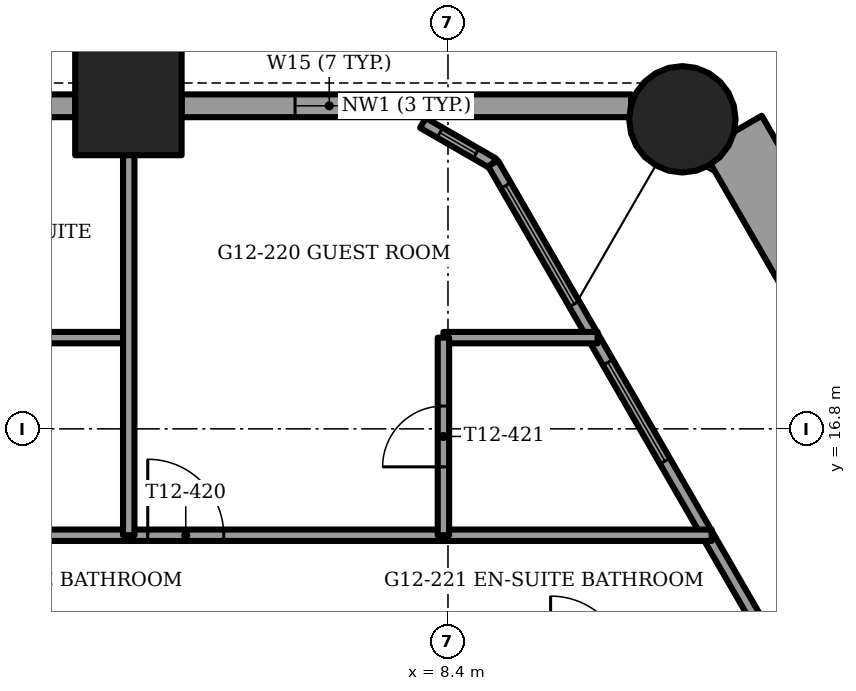
"""IFC4 building model, lengths in metres.
Left out: names, types, materials, properties, quantities, classifications, styles, units other than length and angle.
Written with IfcOpenShell. Run it as: python <this file> out.ifc"""

import sys

from ifc_helpers import new_model, si_unit, direction, frame, frame_2d, origin, origin_2d, place, context, subcontext, project, spatial, rectangle, circle, extrude, element, fill, save


model = new_model("IFC4")
c1 = context("Model", 3, precision=1e-05, world=origin(), true_north=direction((0.0, 1.0)))
c2 = subcontext(c1, "Body", "Model", "MODEL_VIEW")
j1 = project(units=[si_unit("LENGTHUNIT", "METRE"), si_unit("PLANEANGLEUNIT", "RADIAN")], contexts=[c1])
p1 = place(None, origin())
s1 = spatial("IfcSite", under=j1, at=p1, CompositionType="ELEMENT")
p2 = place(p1, origin())
s2 = spatial("IfcBuilding", under=s1, at=p2, CompositionType="ELEMENT")
p3 = place(p2, frame((0.0, 0.0, 50.5)))
s3 = spatial("IfcBuildingStorey", under=s2, at=p3, CompositionType="ELEMENT", Elevation=50.5)
p4 = place(p3, frame((11.484, 20.872, -1.2), z_axis=(0.0, 0.0, 1.0), x_axis=(1.0, 0.0, 0.0)))
e1 = element("IfcColumn", 1, at=p4, inside=s3, PredefinedType="COLUMN", context=c2, shape_type="SweptSolid", body=[
    extrude(circle(Radius=0.7, at=origin_2d()), origin(), (0.0, 0.0, 1.0), 3.75),
])
p5 = place(p3, frame((4.195, 21.1, -1.2), z_axis=(0.0, 0.0, 1.0), x_axis=(1.0, 0.0, 0.0)))
e2 = element("IfcColumn", 2, at=p5, inside=s3, PredefinedType="COLUMN", context=c2, shape_type="SweptSolid", body=[
    extrude(rectangle(XDim=1.4, YDim=1.4, at=origin_2d()), origin(), (0.0, 0.0, 1.0), 3.75),
])
p6 = place(p3, frame((15.632, 14.643, 0.0), z_axis=(0.0, 0.0, 1.0), x_axis=(-0.500009789943, 0.866019751484, 0.0)))
e3 = element("IfcWall", 3, at=p6, inside=s3, PredefinedType="PARAPET", context=c2, shape_type="SweptSolid", body=[
    extrude(rectangle(XDim=6.987, YDim=0.9, at=frame_2d((3.494, 0.0))), origin(), (0.0, 0.0, 1.0), 1.1),
])
p7 = place(p3, frame((10.81, 21.05, 0.0), z_axis=(0.0, 0.0, 1.0), x_axis=(-1.0, 0.0, 0.0)))
e4 = element("IfcWall", 4, at=p7, inside=s3, PredefinedType="SOLIDWALL", context=c2, shape_type="SweptSolid", body=[
    extrude(rectangle(XDim=5.914, YDim=0.3, at=frame_2d((2.957, 0.0))), origin(), (0.0, 0.0, 1.0), 2.55),
])
p8 = place(p7, frame((3.522, 0.0, 0.15)))
e5 = element("IfcOpeningElement", 5, at=p8, cuts=e4, PredefinedType="OPENING", context=c2, shape_type="SweptSolid", body=[
    extrude(rectangle(XDim=0.9, YDim=2.15, at=frame_2d((0.45, 1.075))), frame((0.0, 0.15, 0.0), z_axis=(0.0, -1.0, 0.0), x_axis=(1.0, 0.0, 0.0)), (0.0, 0.0, 1.0), 0.3),
])
p9 = place(p3, frame((3.495, 21.05, 0.0), z_axis=(0.0, 0.0, 1.0), x_axis=(-1.0, 0.0, 0.0)))
e6 = element("IfcWall", 6, at=p9, inside=s3, PredefinedType="SOLIDWALL", context=c2, shape_type="SweptSolid", body=[
    extrude(rectangle(XDim=6.991, YDim=0.3, at=frame_2d((3.495, 0.0))), origin(), (0.0, 0.0, 1.0), 2.55),
])
p10 = place(p9, frame((1.3, 0.0, 0.15)))
e7 = element("IfcOpeningElement", 7, at=p10, cuts=e6, PredefinedType="OPENING", context=c2, shape_type="SweptSolid", body=[
    extrude(rectangle(XDim=0.9, YDim=2.15, at=frame_2d((0.45, 1.075))), frame((0.0, 0.15, 0.0), z_axis=(0.0, -1.0, 0.0), x_axis=(1.0, 0.0, 0.0)), (0.0, 0.0, 1.0), 0.3),
])
p11 = place(p9, frame((4.795, 0.0, 0.15)))
e8 = element("IfcOpeningElement", 8, at=p11, cuts=e6, PredefinedType="OPENING", context=c2, shape_type="SweptSolid", body=[
    extrude(rectangle(XDim=0.9, YDim=2.15, at=frame_2d((0.45, 1.075))), frame((0.0, 0.15, 0.0), z_axis=(0.0, -1.0, 0.0), x_axis=(1.0, 0.0, 0.0)), (0.0, 0.0, 1.0), 0.3),
])
p12 = place(p3, frame((20.685, 0.042, 0.0), z_axis=(0.0, 0.0, 1.0), x_axis=(-0.49999960747, 0.866025630412, 0.0)))
e9 = element("IfcWall", 9, at=p12, inside=s3, PredefinedType="SOLIDWALL", context=c2, shape_type="SweptSolid", body=[
    extrude(rectangle(XDim=23.384, YDim=0.15, at=frame_2d((11.692, 0.0))), origin(), (0.0, 0.0, 1.0), 3.45),
])
p13 = place(p12, frame((4.491, 0.0, 0.15)))
e10 = element("IfcOpeningElement", 10, at=p13, cuts=e9, PredefinedType="OPENING", context=c2, shape_type="SweptSolid", body=[
    extrude(rectangle(XDim=1.8, YDim=2.85, at=frame_2d((0.9, 1.425))), frame((0.0, 0.075, 0.0), z_axis=(0.0, -1.0, 0.0), x_axis=(1.0, 0.0, 0.0)), (0.0, 0.0, 1.0), 0.15),
])
p14 = place(p12, frame((6.406, 0.0, 0.15)))
e11 = element("IfcOpeningElement", 11, at=p14, cuts=e9, PredefinedType="OPENING", context=c2, shape_type="SweptSolid", body=[
    extrude(rectangle(XDim=1.5, YDim=2.85, at=frame_2d((0.75, 1.425))), frame((0.0, 0.075, 0.0), z_axis=(0.0, -1.0, 0.0), x_axis=(1.0, 0.0, 0.0)), (0.0, 0.0, 1.0), 0.15),
])
p15 = place(p12, frame((8.506, 0.0, 0.15)))
e12 = element("IfcOpeningElement", 12, at=p15, cuts=e9, PredefinedType="OPENING", context=c2, shape_type="SweptSolid", body=[
    extrude(rectangle(XDim=1.8, YDim=2.85, at=frame_2d((0.9, 1.425))), frame((0.0, 0.075, 0.0), z_axis=(0.0, -1.0, 0.0), x_axis=(1.0, 0.0, 0.0)), (0.0, 0.0, 1.0), 0.15),
])
p16 = place(p12, frame((10.606, 0.0, 0.15)))
e13 = element("IfcOpeningElement", 13, at=p16, cuts=e9, PredefinedType="OPENING", context=c2, shape_type="SweptSolid", body=[
    extrude(rectangle(XDim=1.5, YDim=2.85, at=frame_2d((0.75, 1.425))), frame((0.0, 0.075, 0.0), z_axis=(0.0, -1.0, 0.0), x_axis=(1.0, 0.0, 0.0)), (0.0, 0.0, 1.0), 0.15),
])
p17 = place(p12, frame((14.806, 0.0, 0.15)))
e14 = element("IfcOpeningElement", 14, at=p17, cuts=e9, PredefinedType="OPENING", context=c2, shape_type="SweptSolid", body=[
    extrude(rectangle(XDim=1.5, YDim=2.85, at=frame_2d((0.75, 1.425))), frame((0.0, 0.075, 0.0), z_axis=(0.0, -1.0, 0.0), x_axis=(1.0, 0.0, 0.0)), (0.0, 0.0, 1.0), 0.15),
])
p18 = place(p12, frame((18.861, 0.0, 0.15)))
e15 = element("IfcOpeningElement", 15, at=p18, cuts=e9, PredefinedType="OPENING", context=c2, shape_type="SweptSolid", body=[
    extrude(rectangle(XDim=1.5, YDim=2.85, at=frame_2d((0.75, 1.425))), frame((0.0, 0.075, 0.0), z_axis=(0.0, -1.0, 0.0), x_axis=(1.0, 0.0, 0.0)), (0.0, 0.0, 1.0), 0.15),
])
p19 = place(p12, frame((1.422, 0.0, 0.15)))
e16 = element("IfcOpeningElement", 16, at=p19, cuts=e9, PredefinedType="OPENING", context=c2, shape_type="SweptSolid", body=[
    extrude(rectangle(XDim=1.8, YDim=2.73, at=frame_2d((0.9, 1.365))), frame((0.0, 0.075, 0.0), z_axis=(0.0, -1.0, 0.0), x_axis=(1.0, 0.0, 0.0)), (0.0, 0.0, 1.0), 0.15),
])
p20 = place(p12, frame((21.247, 0.0, 0.15)))
e17 = element("IfcOpeningElement", 17, at=p20, cuts=e9, PredefinedType="OPENING", context=c2, shape_type="SweptSolid", body=[
    extrude(rectangle(XDim=1.8, YDim=2.73, at=frame_2d((0.9, 1.365))), frame((0.0, 0.075, 0.0), z_axis=(0.0, -1.0, 0.0), x_axis=(1.0, 0.0, 0.0)), (0.0, 0.0, 1.0), 0.15),
])
p21 = place(p3, frame((8.993, 20.292, 0.0), z_axis=(0.0, 0.0, 1.0), x_axis=(-0.866048165231, 0.499960573946, 0.0)))
e18 = element("IfcWall", 18, at=p21, inside=s3, PredefinedType="SOLIDWALL", context=c2, shape_type="SweptSolid", body=[
    extrude(rectangle(XDim=1.065, YDim=0.15, at=frame_2d((0.532, 0.0))), origin(), (0.0, 0.0, 1.0), 3.45),
])
p22 = place(p21, frame((0.258, 0.0, 0.15)))
e19 = element("IfcOpeningElement", 19, at=p22, cuts=e18, PredefinedType="OPENING", context=c2, shape_type="SweptSolid", body=[
    extrude(rectangle(XDim=0.55, YDim=2.85, at=frame_2d((0.275, 1.425))), frame((0.0, 0.075, 0.0), z_axis=(0.0, -1.0, 0.0), x_axis=(1.0, 0.0, 0.0)), (0.0, 0.0, 1.0), 0.15),
])
p23 = place(p3, frame((-11.869, 15.4, 0.0), z_axis=(0.0, 0.0, 1.0), x_axis=(1.0, 0.0, 0.0)))
e20 = element("IfcWall", 20, at=p23, inside=s3, PredefinedType="PARTITIONING", context=c2, shape_type="SweptSolid", body=[
    extrude(rectangle(XDim=23.738, YDim=0.15, at=frame_2d((11.869, 0.0))), origin(), (0.0, 0.0, 1.0), 3.45),
])
p24 = place(p23, frame((0.869, 0.0, 0.0)))
e21 = element("IfcOpeningElement", 21, at=p24, cuts=e20, PredefinedType="OPENING", context=c2, shape_type="SweptSolid", body=[
    extrude(rectangle(XDim=1.0, YDim=2.1, at=frame_2d((0.5, 1.05))), frame((0.0, 0.075, 0.0), z_axis=(0.0, -1.0, 0.0), x_axis=(1.0, 0.0, 0.0)), (0.0, 0.0, 1.0), 0.15),
])
p25 = place(p23, frame((9.269, 0.0, 0.0)))
e22 = element("IfcOpeningElement", 22, at=p25, cuts=e20, PredefinedType="OPENING", context=c2, shape_type="SweptSolid", body=[
    extrude(rectangle(XDim=1.0, YDim=2.1, at=frame_2d((0.5, 1.05))), frame((0.0, 0.075, 0.0), z_axis=(0.0, -1.0, 0.0), x_axis=(1.0, 0.0, 0.0)), (0.0, 0.0, 1.0), 0.15),
])
p26 = place(p23, frame((16.319, 0.0, 0.0)))
e23 = element("IfcOpeningElement", 23, at=p26, cuts=e20, PredefinedType="OPENING", context=c2, shape_type="SweptSolid", body=[
    extrude(rectangle(XDim=1.0, YDim=2.1, at=frame_2d((0.5, 1.05))), frame((0.0, 0.075, 0.0), z_axis=(0.0, -1.0, 0.0), x_axis=(1.0, 0.0, 0.0)), (0.0, 0.0, 1.0), 0.15),
])
p27 = place(p3, frame((1.4, 18.0, 0.0), z_axis=(0.0, 0.0, 1.0), x_axis=(1.0, 0.0, 0.0)))
e24 = element("IfcWall", 24, at=p27, inside=s3, PredefinedType="PARTITIONING", context=c2, shape_type="SweptSolid", body=[
    extrude(rectangle(XDim=2.8, YDim=0.15, at=frame_2d((1.4, 0.0))), origin(), (0.0, 0.0, 1.0), 3.45),
])
p28 = place(p3, frame((8.34, 18.0, 0.0), z_axis=(0.0, 0.0, 1.0), x_axis=(1.0, 0.0, 0.0)))
e25 = element("IfcWall", 25, at=p28, inside=s3, PredefinedType="PARTITIONING", context=c2, shape_type="SweptSolid", body=[
    extrude(rectangle(XDim=2.028, YDim=0.15, at=frame_2d((1.014, 0.0))), origin(), (0.0, 0.0, 1.0), 3.45),
])
p29 = place(p3, frame((8.34, 15.4, 0.0), z_axis=(0.0, 0.0, 1.0), x_axis=(0.0, 1.0, 0.0)))
e26 = element("IfcWall", 26, at=p29, inside=s3, PredefinedType="PARTITIONING", context=c2, shape_type="SweptSolid", body=[
    extrude(rectangle(XDim=2.6, YDim=0.15, at=frame_2d((1.3, 0.0))), origin(), (0.0, 0.0, 1.0), 3.45),
])
p30 = place(p29, frame((0.9, 0.0, 0.0)))
e27 = element("IfcOpeningElement", 27, at=p30, cuts=e26, PredefinedType="OPENING", context=c2, shape_type="SweptSolid", body=[
    extrude(rectangle(XDim=0.8, YDim=2.1, at=frame_2d((0.4, 1.05))), frame((0.0, 0.075, 0.0), z_axis=(0.0, -1.0, 0.0), x_axis=(1.0, 0.0, 0.0)), (0.0, 0.0, 1.0), 0.15),
])
p31 = place(p3, frame((4.2, 15.4, 0.0), z_axis=(0.0, 0.0, 1.0), x_axis=(0.0, 1.0, 0.0)))
e28 = element("IfcWall", 28, at=p31, inside=s3, PredefinedType="PARTITIONING", context=c2, shape_type="SweptSolid", body=[
    extrude(rectangle(XDim=5.47, YDim=0.15, at=frame_2d((2.735, 0.0))), origin(), (0.0, 0.0, 1.0), 3.45),
])
p32 = place(p8, origin())
e29 = element("IfcWindow", 29, at=p32, inside=s3, PartitioningType="SINGLE_PANEL", PredefinedType="WINDOW", context=c2, shape_type="SweptSolid", body=[
    extrude(rectangle(XDim=0.9, YDim=2.15, at=frame_2d((0.45, 1.075))), frame((0.0, 0.03, 0.0), z_axis=(0.0, -1.0, 0.0), x_axis=(1.0, 0.0, 0.0)), (0.0, 0.0, 1.0), 0.06),
])
fill(e5, e29)
p33 = place(p18, origin())
e30 = element("IfcWindow", 30, at=p33, inside=s3, PartitioningType="SINGLE_PANEL", PredefinedType="WINDOW", context=c2, shape_type="SweptSolid", body=[
    extrude(rectangle(XDim=1.5, YDim=2.85, at=frame_2d((0.75, 1.425))), frame((0.0, 0.03, 0.0), z_axis=(0.0, -1.0, 0.0), x_axis=(1.0, 0.0, 0.0)), (0.0, 0.0, 1.0), 0.06),
])
fill(e15, e30)
p34 = place(p20, origin())
e31 = element("IfcWindow", 31, at=p34, inside=s3, PartitioningType="SINGLE_PANEL", PredefinedType="WINDOW", context=c2, shape_type="SweptSolid", body=[
    extrude(rectangle(XDim=1.8, YDim=2.73, at=frame_2d((0.9, 1.365))), frame((0.0, 0.03, 0.0), z_axis=(0.0, -1.0, 0.0), x_axis=(1.0, 0.0, 0.0)), (0.0, 0.0, 1.0), 0.06),
])
fill(e17, e31)
p35 = place(p22, origin())
e32 = element("IfcWindow", 32, at=p35, inside=s3, PartitioningType="SINGLE_PANEL", PredefinedType="WINDOW", context=c2, shape_type="SweptSolid", body=[
    extrude(rectangle(XDim=0.55, YDim=2.85, at=frame_2d((0.275, 1.425))), frame((0.0, 0.03, 0.0), z_axis=(0.0, -1.0, 0.0), x_axis=(1.0, 0.0, 0.0)), (0.0, 0.0, 1.0), 0.06),
])
fill(e19, e32)
p36 = place(p26, origin())
e33 = element("IfcDoor", 33, at=p36, inside=s3, OperationType="SINGLE_SWING_LEFT", PredefinedType="DOOR", context=c2, shape_type="SweptSolid", body=[
    extrude(rectangle(XDim=1.0, YDim=2.1, at=frame_2d((0.5, 1.05))), frame((0.0, 0.025, 0.0), z_axis=(0.0, -1.0, 0.0), x_axis=(1.0, 0.0, 0.0)), (0.0, 0.0, 1.0), 0.05),
])
fill(e23, e33)
p37 = place(p30, origin())
e34 = element("IfcDoor", 34, at=p37, inside=s3, OperationType="SINGLE_SWING_LEFT", PredefinedType="DOOR", context=c2, shape_type="SweptSolid", body=[
    extrude(rectangle(XDim=0.8, YDim=2.1, at=frame_2d((0.4, 1.05))), frame((0.0, 0.025, 0.0), z_axis=(0.0, -1.0, 0.0), x_axis=(1.0, 0.0, 0.0)), (0.0, 0.0, 1.0), 0.05),
])
fill(e27, e34)
save(model, sys.argv[1])
